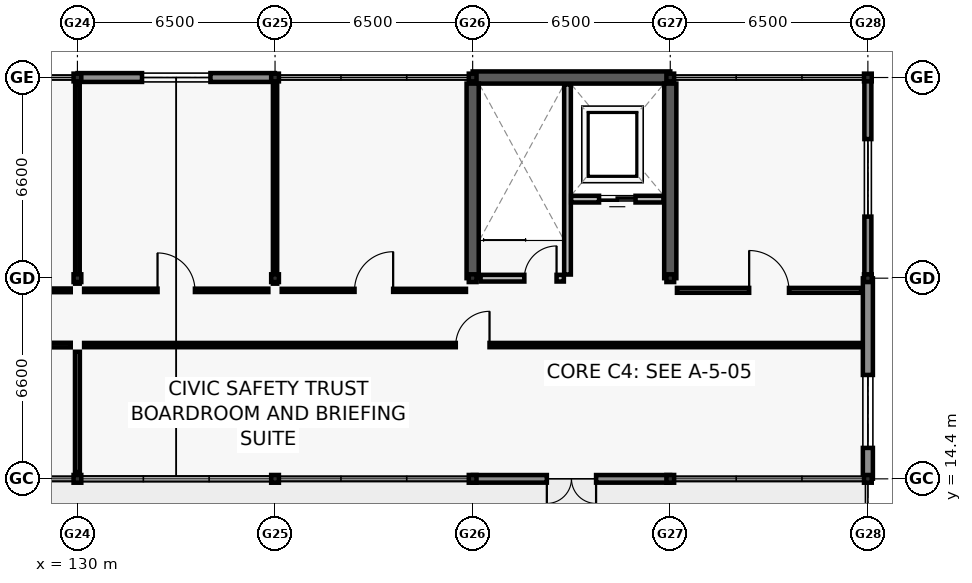
"""IFC4 building model, lengths in metres.
Left out: names, types, materials, properties, quantities, classifications, styles, units other than length and angle.
Written with IfcOpenShell. Run it as: python <this file> out.ifc"""

import sys

from ifc_helpers import new_model, si_unit, direction, frame, frame_2d, origin, origin_2d, place, context, subcontext, project, spatial, rectangle, i_section, extrude, element, fill, save


model = new_model("IFC4")
c1 = context("Model", 3, precision=1e-05, world=origin(), true_north=direction((0.0, 1.0)))
c2 = subcontext(c1, "Body", "Model", "MODEL_VIEW")
j1 = project(units=[si_unit("LENGTHUNIT", "METRE"), si_unit("PLANEANGLEUNIT", "RADIAN")], contexts=[c1])
p1 = place(None, origin())
s1 = spatial("IfcSite", under=j1, at=p1, CompositionType="ELEMENT")
p2 = place(p1, origin())
s2 = spatial("IfcBuilding", under=s1, at=p2, CompositionType="ELEMENT")
p3 = place(p2, frame((0.0, 0.0, 21.3)))
s3 = spatial("IfcBuildingStorey", under=s2, at=p3, CompositionType="ELEMENT", Elevation=21.3)
for number, where, z_axis, x_axis in (
    (1, (130.0, 14.4, 0.0), (0.0, 0.0, 1.0), (1.0, 0.0, 0.0)),
    (2, (130.0, 21.0, 0.0), (0.0, 0.0, 1.0), (1.0, 0.0, 0.0)),
    (3, (130.0, 27.6, 0.0), (0.0, 0.0, 1.0), (1.0, 0.0, 0.0)),
    (4, (136.5, 14.4, 0.0), (0.0, 0.0, 1.0), (1.0, 0.0, 0.0)),
    (5, (136.5, 21.0, 0.0), (0.0, 0.0, 1.0), (1.0, 0.0, 0.0)),
    (6, (136.5, 27.6, 0.0), (0.0, 0.0, 1.0), (1.0, 0.0, 0.0)),
    (7, (143.0, 14.4, 0.0), (0.0, 0.0, 1.0), (1.0, 0.0, 0.0)),
    (8, (143.0, 21.0, 0.0), (0.0, 0.0, 1.0), (1.0, 0.0, 0.0)),
    (9, (143.0, 27.6, 0.0), (0.0, 0.0, 1.0), (1.0, 0.0, 0.0)),
    (10, (149.5, 14.4, 0.0), (0.0, 0.0, 1.0), (1.0, 0.0, 0.0)),
    (11, (149.5, 21.0, 0.0), (0.0, 0.0, 1.0), (1.0, 0.0, 0.0)),
    (12, (149.5, 27.6, 0.0), (0.0, 0.0, 1.0), (1.0, 0.0, 0.0)),
    (13, (156.0, 14.4, 0.0), (0.0, 0.0, 1.0), (1.0, 0.0, 0.0)),
    (14, (156.0, 21.0, 0.0), (0.0, 0.0, 1.0), (1.0, 0.0, 0.0)),
    (15, (156.0, 27.6, 0.0), (0.0, 0.0, 1.0), (1.0, 0.0, 0.0)),
):
    element("IfcColumn", number, at=place(p3, frame(where, z_axis=z_axis, x_axis=x_axis)), inside=s3, PredefinedType="COLUMN", context=c2, shape_type="SweptSolid", body=[
        extrude(i_section(OverallWidth=0.254, OverallDepth=0.254, WebThickness=0.009, FlangeThickness=0.014, FilletRadius=0.013, at=origin_2d()), origin(), (0.0, 0.0, 1.0), 3.9),
    ])
p4 = place(p3, frame((143.0, 27.6, 0.0), z_axis=(0.0, 0.0, 1.0), x_axis=(1.0, 0.0, 0.0)))
e16 = element("IfcWall", 16, at=p4, inside=s3, PredefinedType="SHEAR", context=c2, shape_type="SweptSolid", body=[
    extrude(rectangle(XDim=6.5, YDim=0.4, at=frame_2d((3.25, 0.0))), origin(), (0.0, 0.0, 1.0), 3.66),
])
for number, where, z_axis, x_axis in (
    (17, (143.0, 21.0, 0.0), (0.0, 0.0, 1.0), (0.0, 1.0, 0.0)),
    (18, (149.5, 21.0, 0.0), (0.0, 0.0, 1.0), (0.0, 1.0, 0.0)),
):
    element("IfcWall", number, at=place(p3, frame(where, z_axis=z_axis, x_axis=x_axis)), inside=s3, PredefinedType="SHEAR", context=c2, shape_type="SweptSolid", body=[
        extrude(rectangle(XDim=6.4, YDim=0.4, at=frame_2d((3.2, 0.0))), origin(), (0.0, 0.0, 1.0), 3.66),
    ])
p5 = place(p3, frame((149.495, 14.4, 0.0), z_axis=(0.0, 0.0, 1.0), x_axis=(-1.0, 0.0, 0.0)))
e19 = element("IfcWall", 19, at=p5, inside=s3, PredefinedType="SOLIDWALL", context=c2, shape_type="SweptSolid", body=[
    extrude(rectangle(XDim=6.49, YDim=0.25, at=frame_2d((3.245, 0.0))), origin(), (0.0, 0.0, 1.0), 3.02),
])
p6 = place(p5, frame((2.435, 0.0, 0.0)))
e20 = element("IfcOpeningElement", 20, at=p6, cuts=e19, PredefinedType="OPENING", context=c2, shape_type="SweptSolid", body=[
    extrude(rectangle(XDim=1.62, YDim=2.18, at=frame_2d((0.81, 1.09))), frame((0.0, 0.135, 0.0), z_axis=(0.0, -1.0, 0.0), x_axis=(1.0, 0.0, 0.0)), (0.0, 0.0, 1.0), 0.27),
])
p7 = place(p3, frame((130.005, 27.6, 0.0), z_axis=(0.0, 0.0, 1.0), x_axis=(1.0, 0.0, 0.0)))
e21 = element("IfcWall", 21, at=p7, inside=s3, PredefinedType="SOLIDWALL", context=c2, shape_type="SweptSolid", body=[
    extrude(rectangle(XDim=6.49, YDim=0.29, at=frame_2d((3.245, 0.0))), origin(), (0.0, 0.0, 1.0), 3.02),
])
p8 = place(p7, frame((2.12, 0.0, 0.8)))
e22 = element("IfcOpeningElement", 22, at=p8, cuts=e21, PredefinedType="OPENING", context=c2, shape_type="SweptSolid", body=[
    extrude(rectangle(XDim=2.25, YDim=1.95, at=frame_2d((1.125, 0.975))), frame((0.0, 0.155, 0.0), z_axis=(0.0, -1.0, 0.0), x_axis=(1.0, 0.0, 0.0)), (0.0, 0.0, 1.0), 0.31),
])
p9 = place(p3, frame((156.0, 20.995, 0.0), z_axis=(0.0, 0.0, 1.0), x_axis=(0.0, -1.0, 0.0)))
e23 = element("IfcWall", 23, at=p9, inside=s3, PredefinedType="SOLIDWALL", context=c2, shape_type="SweptSolid", body=[
    extrude(rectangle(XDim=6.59, YDim=0.33, at=frame_2d((3.295, 0.0))), origin(), (0.0, 0.0, 1.0), 3.02),
])
p10 = place(p9, frame((3.177, 0.0, 0.72)))
e24 = element("IfcOpeningElement", 24, at=p10, cuts=e23, PredefinedType="OPENING", context=c2, shape_type="SweptSolid", body=[
    extrude(rectangle(XDim=2.4, YDim=2.1, at=frame_2d((1.2, 1.05))), frame((0.0, 0.175, 0.0), z_axis=(0.0, -1.0, 0.0), x_axis=(1.0, 0.0, 0.0)), (0.0, 0.0, 1.0), 0.35),
])
p11 = place(p3, frame((156.0, 27.595, 0.0), z_axis=(0.0, 0.0, 1.0), x_axis=(0.0, -1.0, 0.0)))
e25 = element("IfcWall", 25, at=p11, inside=s3, PredefinedType="SOLIDWALL", context=c2, shape_type="SweptSolid", body=[
    extrude(rectangle(XDim=6.59, YDim=0.23, at=frame_2d((3.295, 0.0))), origin(), (0.0, 0.0, 1.0), 3.02),
])
p12 = place(p11, frame((2.02, 0.0, 0.72)))
e26 = element("IfcOpeningElement", 26, at=p12, cuts=e25, PredefinedType="OPENING", context=c2, shape_type="SweptSolid", body=[
    extrude(rectangle(XDim=2.55, YDim=2.1, at=frame_2d((1.275, 1.05))), frame((0.0, 0.125, 0.0), z_axis=(0.0, -1.0, 0.0), x_axis=(1.0, 0.0, 0.0)), (0.0, 0.0, 1.0), 0.25),
])
p13 = place(p3, frame((146.12, 21.12, 0.0), z_axis=(0.0, 0.0, 1.0), x_axis=(0.0, 1.0, 0.0)))
e27 = element("IfcWall", 27, at=p13, inside=s3, PredefinedType="SOLIDWALL", context=c2, shape_type="SweptSolid", body=[
    extrude(rectangle(XDim=6.255, YDim=0.22, at=frame_2d((3.127, 0.0))), origin(), (0.0, 0.0, 1.0), 3.02),
])
p14 = place(p3, frame((143.26, 21.0, 0.0), z_axis=(0.0, 0.0, 1.0), x_axis=(1.0, 0.0, 0.0)))
e28 = element("IfcWall", 28, at=p14, inside=s3, PredefinedType="SOLIDWALL", context=c2, shape_type="SweptSolid", body=[
    extrude(rectangle(XDim=2.74, YDim=0.22, at=frame_2d((1.37, 0.0))), origin(), (0.0, 0.0, 1.0), 3.02),
])
p15 = place(p14, frame((1.44, 0.0, 0.0)))
e29 = element("IfcOpeningElement", 29, at=p15, cuts=e28, PredefinedType="OPENING", context=c2, shape_type="SweptSolid", body=[
    extrude(rectangle(XDim=1.06, YDim=2.1, at=frame_2d((0.53, 1.05))), frame((0.0, 0.12, 0.0), z_axis=(0.0, -1.0, 0.0), x_axis=(1.0, 0.0, 0.0)), (0.0, 0.0, 1.0), 0.24),
])
p16 = place(p3, frame((146.24, 23.6, 0.0), z_axis=(0.0, 0.0, 1.0), x_axis=(1.0, 0.0, 0.0)))
e30 = element("IfcWall", 30, at=p16, inside=s3, PredefinedType="SOLIDWALL", context=c2, shape_type="SweptSolid", body=[
    extrude(rectangle(XDim=3.035, YDim=0.22, at=frame_2d((1.518, 0.0))), origin(), (0.0, 0.0, 1.0), 3.02),
])
p17 = place(p16, frame((0.917, 0.0, 0.0)))
e31 = element("IfcOpeningElement", 31, at=p17, cuts=e30, PredefinedType="OPENING", context=c2, shape_type="SweptSolid", body=[
    extrude(rectangle(XDim=1.2, YDim=2.15, at=frame_2d((0.6, 1.075))), frame((0.0, 0.12, 0.0), z_axis=(0.0, -1.0, 0.0), x_axis=(1.0, 0.0, 0.0)), (0.0, 0.0, 1.0), 0.24),
])
p18 = place(p3, frame((130.0, 14.62, 0.0), z_axis=(0.0, 0.0, 1.0), x_axis=(0.0, 1.0, 0.0)))
e32 = element("IfcWall", 32, at=p18, inside=s3, PredefinedType="PARTITIONING", context=c2, shape_type="SweptSolid", body=[
    extrude(rectangle(XDim=3.96, YDim=0.16, at=frame_2d((1.98, 0.0))), origin(), (0.0, 0.0, 1.0), 3.0),
])
p19 = place(p3, frame((110.72, 18.8, 0.0), z_axis=(0.0, 0.0, 1.0), x_axis=(1.0, 0.0, 0.0)))
e33 = element("IfcWall", 33, at=p19, inside=s3, PredefinedType="PARTITIONING", context=c2, shape_type="SweptSolid", body=[
    extrude(rectangle(XDim=19.06, YDim=0.15, at=frame_2d((9.53, 0.0))), origin(), (0.0, 0.0, 1.0), 3.0),
])
p20 = place(p19, frame((8.995, 0.0, 0.0)))
e34 = element("IfcOpeningElement", 34, at=p20, cuts=e33, PredefinedType="OPENING", context=c2, shape_type="SweptSolid", body=[
    extrude(rectangle(XDim=1.07, YDim=2.08, at=frame_2d((0.535, 1.04))), frame((0.0, 0.085, 0.0), z_axis=(0.0, -1.0, 0.0), x_axis=(1.0, 0.0, 0.0)), (0.0, 0.0, 1.0), 0.17),
])
p21 = place(p3, frame((130.22, 18.8, 0.0), z_axis=(0.0, 0.0, 1.0), x_axis=(1.0, 0.0, 0.0)))
e35 = element("IfcWall", 35, at=p21, inside=s3, PredefinedType="PARTITIONING", context=c2, shape_type="SweptSolid", body=[
    extrude(rectangle(XDim=25.56, YDim=0.14, at=frame_2d((12.78, 0.0))), origin(), (0.0, 0.0, 1.0), 3.0),
])
p22 = place(p21, frame((12.225, 0.0, 0.0)))
e36 = element("IfcOpeningElement", 36, at=p22, cuts=e35, PredefinedType="OPENING", context=c2, shape_type="SweptSolid", body=[
    extrude(rectangle(XDim=1.11, YDim=2.1, at=frame_2d((0.555, 1.05))), frame((0.0, 0.08, 0.0), z_axis=(0.0, -1.0, 0.0), x_axis=(1.0, 0.0, 0.0)), (0.0, 0.0, 1.0), 0.16),
])
p23 = place(p3, frame((123.35, 20.6, 0.0), z_axis=(0.0, 0.0, 1.0), x_axis=(1.0, 0.0, 0.0)))
e37 = element("IfcWall", 37, at=p23, inside=s3, PredefinedType="PARTITIONING", context=c2, shape_type="SweptSolid", body=[
    extrude(rectangle(XDim=6.43, YDim=0.12, at=frame_2d((3.215, 0.0))), origin(), (0.0, 0.0, 1.0), 3.0),
])
p24 = place(p23, frame((2.62, 0.0, 0.0)))
e38 = element("IfcOpeningElement", 38, at=p24, cuts=e37, PredefinedType="OPENING", context=c2, shape_type="SweptSolid", body=[
    extrude(rectangle(XDim=1.19, YDim=2.14, at=frame_2d((0.595, 1.07))), frame((0.0, 0.07, 0.0), z_axis=(0.0, -1.0, 0.0), x_axis=(1.0, 0.0, 0.0)), (0.0, 0.0, 1.0), 0.14),
])
p25 = place(p3, frame((130.22, 20.6, 0.0), z_axis=(0.0, 0.0, 1.0), x_axis=(1.0, 0.0, 0.0)))
e39 = element("IfcWall", 39, at=p25, inside=s3, PredefinedType="PARTITIONING", context=c2, shape_type="SweptSolid", body=[
    extrude(rectangle(XDim=6.06, YDim=0.11, at=frame_2d((3.03, 0.0))), origin(), (0.0, 0.0, 1.0), 3.0),
])
p26 = place(p25, frame((2.415, 0.0, 0.0)))
e40 = element("IfcOpeningElement", 40, at=p26, cuts=e39, PredefinedType="OPENING", context=c2, shape_type="SweptSolid", body=[
    extrude(rectangle(XDim=1.23, YDim=2.08, at=frame_2d((0.615, 1.04))), frame((0.0, 0.065, 0.0), z_axis=(0.0, -1.0, 0.0), x_axis=(1.0, 0.0, 0.0)), (0.0, 0.0, 1.0), 0.13),
])
p27 = place(p3, frame((136.72, 20.6, 0.0), z_axis=(0.0, 0.0, 1.0), x_axis=(1.0, 0.0, 0.0)))
e41 = element("IfcWall", 41, at=p27, inside=s3, PredefinedType="PARTITIONING", context=c2, shape_type="SweptSolid", body=[
    extrude(rectangle(XDim=6.06, YDim=0.1, at=frame_2d((3.03, 0.0))), origin(), (0.0, 0.0, 1.0), 3.0),
])
p28 = place(p27, frame((2.395, 0.0, 0.0)))
e42 = element("IfcOpeningElement", 42, at=p28, cuts=e41, PredefinedType="OPENING", context=c2, shape_type="SweptSolid", body=[
    extrude(rectangle(XDim=1.27, YDim=2.1, at=frame_2d((0.635, 1.05))), frame((0.0, 0.06, 0.0), z_axis=(0.0, -1.0, 0.0), x_axis=(1.0, 0.0, 0.0)), (0.0, 0.0, 1.0), 0.12),
])
p29 = place(p3, frame((149.72, 20.6, 0.0), z_axis=(0.0, 0.0, 1.0), x_axis=(1.0, 0.0, 0.0)))
e43 = element("IfcWall", 43, at=p29, inside=s3, PredefinedType="PARTITIONING", context=c2, shape_type="SweptSolid", body=[
    extrude(rectangle(XDim=6.06, YDim=0.16, at=frame_2d((3.03, 0.0))), origin(), (0.0, 0.0, 1.0), 3.0),
])
p30 = place(p29, frame((2.375, 0.0, 0.0)))
e44 = element("IfcOpeningElement", 44, at=p30, cuts=e43, PredefinedType="OPENING", context=c2, shape_type="SweptSolid", body=[
    extrude(rectangle(XDim=1.31, YDim=2.14, at=frame_2d((0.655, 1.07))), frame((0.0, 0.09, 0.0), z_axis=(0.0, -1.0, 0.0), x_axis=(1.0, 0.0, 0.0)), (0.0, 0.0, 1.0), 0.18),
])
p31 = place(p3, frame((130.0, 20.82, 0.0), z_axis=(0.0, 0.0, 1.0), x_axis=(0.0, 1.0, 0.0)))
e45 = element("IfcWall", 45, at=p31, inside=s3, PredefinedType="PARTITIONING", context=c2, shape_type="SweptSolid", body=[
    extrude(rectangle(XDim=6.56, YDim=0.15, at=frame_2d((3.28, 0.0))), origin(), (0.0, 0.0, 1.0), 3.0),
])
p32 = place(p3, frame((136.5, 20.82, 0.0), z_axis=(0.0, 0.0, 1.0), x_axis=(0.0, 1.0, 0.0)))
e46 = element("IfcWall", 46, at=p32, inside=s3, PredefinedType="PARTITIONING", context=c2, shape_type="SweptSolid", body=[
    extrude(rectangle(XDim=6.56, YDim=0.14, at=frame_2d((3.28, 0.0))), origin(), (0.0, 0.0, 1.0), 3.0),
])
p33 = place(p6, origin())
e47 = element("IfcDoor", 47, at=p33, inside=s3, OperationType="DOUBLE_DOOR_SINGLE_SWING", PredefinedType="DOOR", context=c2, shape_type="SweptSolid", body=[
    extrude(rectangle(XDim=1.62, YDim=2.18, at=frame_2d((0.81, 1.09))), frame((0.0, 0.025, 0.0), z_axis=(0.0, -1.0, 0.0), x_axis=(1.0, 0.0, 0.0)), (0.0, 0.0, 1.0), 0.05),
])
fill(e20, e47)
p34 = place(p8, origin())
e48 = element("IfcWindow", 48, at=p34, inside=s3, PartitioningType="DOUBLE_PANEL_VERTICAL", PredefinedType="WINDOW", context=c2, shape_type="SweptSolid", body=[
    extrude(rectangle(XDim=2.25, YDim=1.95, at=frame_2d((1.125, 0.975))), frame((0.0, 0.03, 0.0), z_axis=(0.0, -1.0, 0.0), x_axis=(1.0, 0.0, 0.0)), (0.0, 0.0, 1.0), 0.06),
])
fill(e22, e48)
p35 = place(p10, origin())
e49 = element("IfcWindow", 49, at=p35, inside=s3, PartitioningType="TRIPLE_PANEL_VERTICAL", PredefinedType="WINDOW", context=c2, shape_type="SweptSolid", body=[
    extrude(rectangle(XDim=2.4, YDim=2.1, at=frame_2d((1.2, 1.05))), frame((0.0, 0.03, 0.0), z_axis=(0.0, -1.0, 0.0), x_axis=(1.0, 0.0, 0.0)), (0.0, 0.0, 1.0), 0.06),
])
fill(e24, e49)
p36 = place(p12, origin())
e50 = element("IfcWindow", 50, at=p36, inside=s3, PartitioningType="TRIPLE_PANEL_VERTICAL", PredefinedType="WINDOW", context=c2, shape_type="SweptSolid", body=[
    extrude(rectangle(XDim=2.55, YDim=2.1, at=frame_2d((1.275, 1.05))), frame((0.0, 0.03, 0.0), z_axis=(0.0, -1.0, 0.0), x_axis=(1.0, 0.0, 0.0)), (0.0, 0.0, 1.0), 0.06),
])
fill(e26, e50)
p37 = place(p15, origin())
e51 = element("IfcDoor", 51, at=p37, inside=s3, OperationType="SINGLE_SWING_RIGHT", PredefinedType="DOOR", context=c2, shape_type="SweptSolid", body=[
    extrude(rectangle(XDim=1.06, YDim=2.1, at=frame_2d((0.53, 1.05))), frame((0.0, 0.025, 0.0), z_axis=(0.0, -1.0, 0.0), x_axis=(1.0, 0.0, 0.0)), (0.0, 0.0, 1.0), 0.05),
])
fill(e29, e51)
p38 = place(p17, origin())
e52 = element("IfcDoor", 52, at=p38, inside=s3, OperationType="DOUBLE_DOOR_SLIDING", PredefinedType="DOOR", context=c2, shape_type="SweptSolid", body=[
    extrude(rectangle(XDim=1.2, YDim=2.15, at=frame_2d((0.6, 1.075))), frame((0.0, 0.025, 0.0), z_axis=(0.0, -1.0, 0.0), x_axis=(1.0, 0.0, 0.0)), (0.0, 0.0, 1.0), 0.05),
])
fill(e31, e52)
p39 = place(p22, origin())
e53 = element("IfcDoor", 53, at=p39, inside=s3, OperationType="SINGLE_SWING_RIGHT", PredefinedType="DOOR", context=c2, shape_type="SweptSolid", body=[
    extrude(rectangle(XDim=1.11, YDim=2.1, at=frame_2d((0.555, 1.05))), frame((0.0, 0.025, 0.0), z_axis=(0.0, -1.0, 0.0), x_axis=(1.0, 0.0, 0.0)), (0.0, 0.0, 1.0), 0.05),
])
fill(e36, e53)
p40 = place(p26, origin())
e54 = element("IfcDoor", 54, at=p40, inside=s3, OperationType="SINGLE_SWING_LEFT", PredefinedType="DOOR", context=c2, shape_type="SweptSolid", body=[
    extrude(rectangle(XDim=1.23, YDim=2.08, at=frame_2d((0.615, 1.04))), frame((0.0, 0.025, 0.0), z_axis=(0.0, -1.0, 0.0), x_axis=(1.0, 0.0, 0.0)), (0.0, 0.0, 1.0), 0.05),
])
fill(e40, e54)
p41 = place(p28, origin())
e55 = element("IfcDoor", 55, at=p41, inside=s3, OperationType="SINGLE_SWING_RIGHT", PredefinedType="DOOR", context=c2, shape_type="SweptSolid", body=[
    extrude(rectangle(XDim=1.27, YDim=2.1, at=frame_2d((0.635, 1.05))), frame((0.0, 0.025, 0.0), z_axis=(0.0, -1.0, 0.0), x_axis=(1.0, 0.0, 0.0)), (0.0, 0.0, 1.0), 0.05),
])
fill(e42, e55)
p42 = place(p30, origin())
e56 = element("IfcDoor", 56, at=p42, inside=s3, OperationType="SINGLE_SWING_LEFT", PredefinedType="DOOR", context=c2, shape_type="SweptSolid", body=[
    extrude(rectangle(XDim=1.31, YDim=2.14, at=frame_2d((0.655, 1.07))), frame((0.0, 0.025, 0.0), z_axis=(0.0, -1.0, 0.0), x_axis=(1.0, 0.0, 0.0)), (0.0, 0.0, 1.0), 0.05),
])
fill(e44, e56)
save(model, sys.argv[1])
